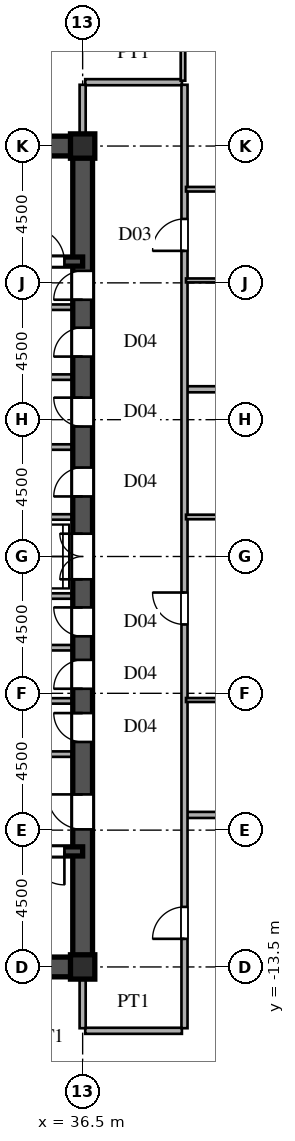
"""IFC4 building model, lengths in metres.
Left out: names, types, materials, properties, quantities, classifications, styles, units other than length and angle.
Written with IfcOpenShell. Run it as: python <this file> out.ifc"""

import sys

from ifc_helpers import new_model, si_unit, direction, frame, frame_2d, origin, origin_2d, place, context, subcontext, project, spatial, rectangle, i_section, extrude, source, transform, mapped, element, fill, save


model = new_model("IFC4")
c1 = context("Model", 3, precision=1e-05, world=origin(), true_north=direction((0.0, 1.0)))
c2 = subcontext(c1, "Body", "Model", "MODEL_VIEW")
j1 = project(units=[si_unit("LENGTHUNIT", "METRE"), si_unit("PLANEANGLEUNIT", "RADIAN")], contexts=[c1])
p1 = place(None, origin())
s1 = spatial("IfcSite", under=j1, at=p1, CompositionType="ELEMENT")
p2 = place(p1, origin())
s2 = spatial("IfcBuilding", under=s1, at=p2, CompositionType="ELEMENT")
p3 = place(p2, frame((0.0, 0.0, 76.5)))
s3 = spatial("IfcBuildingStorey", under=s2, at=p3, CompositionType="ELEMENT", Elevation=76.5)
m1 = source(origin(), c2, "Body", "SweptSolid", [
    extrude(i_section(OverallWidth=0.8, OverallDepth=0.8, WebThickness=0.032, FlangeThickness=0.05, at=origin_2d()), origin(), (0.0, 0.0, 1.0), 3.6),
])
for number, where, z_axis, x_axis in (
    (1, (36.5, -13.5, 0.0), (0.0, 0.0, 1.0), (1.0, 0.0, 0.0)),
    (2, (36.5, 13.5, 0.0), (0.0, 0.0, 1.0), (1.0, 0.0, 0.0)),
):
    element("IfcColumn", number, at=place(p3, frame(where, z_axis=z_axis, x_axis=x_axis)), inside=s3, PredefinedType="COLUMN", context=c2, shape_type="MappedRepresentation", body=[
        mapped(m1, transform((0.0, 0.0, 0.0), scale=1.0)),
    ])
for number, where, z_axis, x_axis in (
    (3, (27.5, -13.5, 0.0), (0.0, 0.0, 1.0), (1.0, 0.0, 0.0)),
    (4, (27.5, 13.5, 0.0), (0.0, 0.0, 1.0), (1.0, 0.0, 0.0)),
):
    element("IfcWall", number, at=place(p3, frame(where, z_axis=z_axis, x_axis=x_axis)), inside=s3, PredefinedType="SHEAR", context=c2, shape_type="SweptSolid", body=[
        extrude(rectangle(XDim=9.0, YDim=0.65, at=frame_2d((4.5, 0.0))), origin(), (0.0, 0.0, 1.0), 3.38),
    ])
p4 = place(p3, frame((36.5, -13.65, 0.0), z_axis=(0.0, 0.0, 1.0), x_axis=(0.0, 1.0, 0.0)))
e5 = element("IfcWall", 5, at=p4, inside=s3, PredefinedType="SHEAR", context=c2, shape_type="SweptSolid", body=[
    extrude(rectangle(XDim=7.15, YDim=0.65, at=frame_2d((3.575, 0.0))), origin(), (0.0, 0.0, 1.0), 3.38),
])
p5 = place(p4, frame((4.675, 0.0, 0.0)))
e6 = element("IfcOpeningElement", 6, at=p5, cuts=e5, PredefinedType="OPENING", context=c2, shape_type="SweptSolid", body=[
    extrude(rectangle(XDim=1.15, YDim=2.2, at=frame_2d((0.575, 1.1))), frame((0.0, 0.335, 0.0), z_axis=(0.0, -1.0, 0.0), x_axis=(1.0, 0.0, 0.0)), (0.0, 0.0, 1.0), 0.67),
])
p6 = place(p3, frame((36.5, -1.3, 0.0), z_axis=(0.0, 0.0, 1.0), x_axis=(0.0, 1.0, 0.0)))
e7 = element("IfcWall", 7, at=p6, inside=s3, PredefinedType="SHEAR", context=c2, shape_type="SweptSolid", body=[
    extrude(rectangle(XDim=2.6, YDim=0.65, at=frame_2d((1.3, 0.0))), origin(), (0.0, 0.0, 1.0), 3.38),
])
p7 = place(p6, frame((0.55, 0.0, 0.0)))
e8 = element("IfcOpeningElement", 8, at=p7, cuts=e7, PredefinedType="OPENING", context=c2, shape_type="SweptSolid", body=[
    extrude(rectangle(XDim=1.5, YDim=2.3, at=frame_2d((0.75, 1.15))), frame((0.0, 0.335, 0.0), z_axis=(0.0, -1.0, 0.0), x_axis=(1.0, 0.0, 0.0)), (0.0, 0.0, 1.0), 0.67),
])
p8 = place(p3, frame((36.5, 8.2, 0.0), z_axis=(0.0, 0.0, 1.0), x_axis=(0.0, 1.0, 0.0)))
e9 = element("IfcWall", 9, at=p8, inside=s3, PredefinedType="SHEAR", context=c2, shape_type="SweptSolid", body=[
    extrude(rectangle(XDim=5.45, YDim=0.65, at=frame_2d((2.725, 0.0))), origin(), (0.0, 0.0, 1.0), 3.38),
])
p9 = place(p8, frame((0.245, 0.0, 0.0)))
e10 = element("IfcOpeningElement", 10, at=p9, cuts=e9, PredefinedType="OPENING", context=c2, shape_type="SweptSolid", body=[
    extrude(rectangle(XDim=0.95, YDim=2.15, at=frame_2d((0.475, 1.075))), frame((0.0, 0.335, 0.0), z_axis=(0.0, -1.0, 0.0), x_axis=(1.0, 0.0, 0.0)), (0.0, 0.0, 1.0), 0.67),
])
p10 = place(p3, frame((36.5, -6.5, 0.0), z_axis=(0.0, 0.0, 1.0), x_axis=(0.0, 1.0, 0.0)))
e11 = element("IfcWall", 11, at=p10, inside=s3, PredefinedType="SHEAR", context=c2, shape_type="SweptSolid", body=[
    extrude(rectangle(XDim=1.75, YDim=0.65, at=frame_2d((0.875, 0.0))), origin(), (0.0, 0.0, 1.0), 3.38),
])
p11 = place(p10, frame((0.4, 0.0, 0.0)))
e12 = element("IfcOpeningElement", 12, at=p11, cuts=e11, PredefinedType="OPENING", context=c2, shape_type="SweptSolid", body=[
    extrude(rectangle(XDim=0.95, YDim=2.15, at=frame_2d((0.475, 1.075))), frame((0.0, 0.335, 0.0), z_axis=(0.0, -1.0, 0.0), x_axis=(1.0, 0.0, 0.0)), (0.0, 0.0, 1.0), 0.67),
])
p12 = place(p3, frame((36.5, -4.75, 0.0), z_axis=(0.0, 0.0, 1.0), x_axis=(0.0, 1.0, 0.0)))
e13 = element("IfcWall", 13, at=p12, inside=s3, PredefinedType="SHEAR", context=c2, shape_type="SweptSolid", body=[
    extrude(rectangle(XDim=1.75, YDim=0.65, at=frame_2d((0.875, 0.0))), origin(), (0.0, 0.0, 1.0), 3.38),
])
p13 = place(p12, frame((0.4, 0.0, 0.0)))
e14 = element("IfcOpeningElement", 14, at=p13, cuts=e13, PredefinedType="OPENING", context=c2, shape_type="SweptSolid", body=[
    extrude(rectangle(XDim=0.95, YDim=2.15, at=frame_2d((0.475, 1.075))), frame((0.0, 0.335, 0.0), z_axis=(0.0, -1.0, 0.0), x_axis=(1.0, 0.0, 0.0)), (0.0, 0.0, 1.0), 0.67),
])
p14 = place(p3, frame((36.5, -3.0, 0.0), z_axis=(0.0, 0.0, 1.0), x_axis=(0.0, 1.0, 0.0)))
e15 = element("IfcWall", 15, at=p14, inside=s3, PredefinedType="SHEAR", context=c2, shape_type="SweptSolid", body=[
    extrude(rectangle(XDim=1.7, YDim=0.65, at=frame_2d((0.85, 0.0))), origin(), (0.0, 0.0, 1.0), 3.38),
])
p15 = place(p14, frame((0.375, 0.0, 0.0)))
e16 = element("IfcOpeningElement", 16, at=p15, cuts=e15, PredefinedType="OPENING", context=c2, shape_type="SweptSolid", body=[
    extrude(rectangle(XDim=0.95, YDim=2.15, at=frame_2d((0.475, 1.075))), frame((0.0, 0.335, 0.0), z_axis=(0.0, -1.0, 0.0), x_axis=(1.0, 0.0, 0.0)), (0.0, 0.0, 1.0), 0.67),
])
p16 = place(p3, frame((36.5, 1.3, 0.0), z_axis=(0.0, 0.0, 1.0), x_axis=(0.0, 1.0, 0.0)))
e17 = element("IfcWall", 17, at=p16, inside=s3, PredefinedType="SHEAR", context=c2, shape_type="SweptSolid", body=[
    extrude(rectangle(XDim=2.3, YDim=0.65, at=frame_2d((1.15, 0.0))), origin(), (0.0, 0.0, 1.0), 3.38),
])
p17 = place(p16, frame((0.675, 0.0, 0.0)))
e18 = element("IfcOpeningElement", 18, at=p17, cuts=e17, PredefinedType="OPENING", context=c2, shape_type="SweptSolid", body=[
    extrude(rectangle(XDim=0.95, YDim=2.15, at=frame_2d((0.475, 1.075))), frame((0.0, 0.335, 0.0), z_axis=(0.0, -1.0, 0.0), x_axis=(1.0, 0.0, 0.0)), (0.0, 0.0, 1.0), 0.67),
])
p18 = place(p3, frame((36.5, 3.6, 0.0), z_axis=(0.0, 0.0, 1.0), x_axis=(0.0, 1.0, 0.0)))
e19 = element("IfcWall", 19, at=p18, inside=s3, PredefinedType="SHEAR", context=c2, shape_type="SweptSolid", body=[
    extrude(rectangle(XDim=2.3, YDim=0.65, at=frame_2d((1.15, 0.0))), origin(), (0.0, 0.0, 1.0), 3.38),
])
p19 = place(p18, frame((0.675, 0.0, 0.0)))
e20 = element("IfcOpeningElement", 20, at=p19, cuts=e19, PredefinedType="OPENING", context=c2, shape_type="SweptSolid", body=[
    extrude(rectangle(XDim=0.95, YDim=2.15, at=frame_2d((0.475, 1.075))), frame((0.0, 0.335, 0.0), z_axis=(0.0, -1.0, 0.0), x_axis=(1.0, 0.0, 0.0)), (0.0, 0.0, 1.0), 0.67),
])
p20 = place(p3, frame((36.5, 5.9, 0.0), z_axis=(0.0, 0.0, 1.0), x_axis=(0.0, 1.0, 0.0)))
e21 = element("IfcWall", 21, at=p20, inside=s3, PredefinedType="SHEAR", context=c2, shape_type="SweptSolid", body=[
    extrude(rectangle(XDim=2.3, YDim=0.65, at=frame_2d((1.15, 0.0))), origin(), (0.0, 0.0, 1.0), 3.38),
])
p21 = place(p20, frame((0.675, 0.0, 0.0)))
e22 = element("IfcOpeningElement", 22, at=p21, cuts=e21, PredefinedType="OPENING", context=c2, shape_type="SweptSolid", body=[
    extrude(rectangle(XDim=0.95, YDim=2.15, at=frame_2d((0.475, 1.075))), frame((0.0, 0.335, 0.0), z_axis=(0.0, -1.0, 0.0), x_axis=(1.0, 0.0, 0.0)), (0.0, 0.0, 1.0), 0.67),
])
p22 = place(p3, frame((27.5, -9.7, 0.0), z_axis=(0.0, 0.0, 1.0), x_axis=(1.0, 0.0, 0.0)))
e23 = element("IfcWall", 23, at=p22, inside=s3, PredefinedType="SHEAR", context=c2, shape_type="SweptSolid", body=[
    extrude(rectangle(XDim=9.0, YDim=0.3, at=frame_2d((4.5, 0.0))), origin(), (0.0, 0.0, 1.0), 3.38),
])
p23 = place(p22, frame((7.3, 0.0, 0.0)))
e24 = element("IfcOpeningElement", 24, at=p23, cuts=e23, PredefinedType="OPENING", context=c2, shape_type="SweptSolid", body=[
    extrude(rectangle(XDim=1.1, YDim=2.2, at=frame_2d((0.55, 1.1))), frame((0.0, 0.16, 0.0), z_axis=(0.0, -1.0, 0.0), x_axis=(1.0, 0.0, 0.0)), (0.0, 0.0, 1.0), 0.32),
])
p24 = place(p3, frame((27.5, 9.7, 0.0), z_axis=(0.0, 0.0, 1.0), x_axis=(1.0, 0.0, 0.0)))
e25 = element("IfcWall", 25, at=p24, inside=s3, PredefinedType="SHEAR", context=c2, shape_type="SweptSolid", body=[
    extrude(rectangle(XDim=9.0, YDim=0.3, at=frame_2d((4.5, 0.0))), origin(), (0.0, 0.0, 1.0), 3.38),
])
p25 = place(p24, frame((7.3, 0.0, 0.0)))
e26 = element("IfcOpeningElement", 26, at=p25, cuts=e25, PredefinedType="OPENING", context=c2, shape_type="SweptSolid", body=[
    extrude(rectangle(XDim=1.1, YDim=2.2, at=frame_2d((0.55, 1.1))), frame((0.0, 0.16, 0.0), z_axis=(0.0, -1.0, 0.0), x_axis=(1.0, 0.0, 0.0)), (0.0, 0.0, 1.0), 0.32),
])
for number, where, z_axis, x_axis in (
    (27, (30.45, -6.5, 0.0), (0.0, 0.0, 1.0), (1.0, 0.0, 0.0)),
    (28, (30.45, 8.2, 0.0), (0.0, 0.0, 1.0), (1.0, 0.0, 0.0)),
):
    element("IfcWall", number, at=place(p3, frame(where, z_axis=z_axis, x_axis=x_axis)), inside=s3, PredefinedType="PARTITIONING", context=c2, shape_type="SweptSolid", body=[
        extrude(rectangle(XDim=5.7, YDim=0.18, at=frame_2d((2.85, 0.0))), origin(), (0.0, 0.0, 1.0), 3.38),
    ])
for number, where, z_axis, x_axis in (
    (29, (33.2, -1.3, 0.0), (0.0, 0.0, 1.0), (1.0, 0.0, 0.0)),
    (30, (33.2, 1.3, 0.0), (0.0, 0.0, 1.0), (1.0, 0.0, 0.0)),
    (31, (33.2, -4.75, 0.0), (0.0, 0.0, 1.0), (1.0, 0.0, 0.0)),
    (32, (33.2, -3.0, 0.0), (0.0, 0.0, 1.0), (1.0, 0.0, 0.0)),
    (33, (33.2, 3.6, 0.0), (0.0, 0.0, 1.0), (1.0, 0.0, 0.0)),
    (34, (33.2, 5.9, 0.0), (0.0, 0.0, 1.0), (1.0, 0.0, 0.0)),
):
    element("IfcWall", number, at=place(p3, frame(where, z_axis=z_axis, x_axis=x_axis)), inside=s3, PredefinedType="PARTITIONING", context=c2, shape_type="SweptSolid", body=[
        extrude(rectangle(XDim=2.95, YDim=0.18, at=frame_2d((1.475, 0.0))), origin(), (0.0, 0.0, 1.0), 3.38),
    ])
p26 = place(p3, frame((36.585, -15.6, 0.0), z_axis=(0.0, 0.0, 1.0), x_axis=(1.0, 0.0, 0.0)))
e35 = element("IfcWall", 35, at=p26, inside=s3, PredefinedType="PARTITIONING", context=c2, shape_type="SweptSolid", body=[
    extrude(rectangle(XDim=3.18, YDim=0.2, at=frame_2d((1.59, 0.0))), origin(), (0.0, 0.0, 1.0), 3.38),
])
p27 = place(p3, frame((39.93, -8.5, 0.0), z_axis=(0.0, 0.0, 1.0), x_axis=(1.0, 0.0, 0.0)))
e36 = element("IfcWall", 36, at=p27, inside=s3, PredefinedType="PARTITIONING", context=c2, shape_type="SweptSolid", body=[
    extrude(rectangle(XDim=28.86, YDim=0.2, at=frame_2d((14.43, 0.0))), origin(), (0.0, 0.0, 1.0), 3.38),
])
p28 = place(p3, frame((39.9, -4.72, 0.0), z_axis=(0.0, 0.0, 1.0), x_axis=(1.0, 0.0, 0.0)))
e37 = element("IfcWall", 37, at=p28, inside=s3, PredefinedType="PARTITIONING", context=c2, shape_type="SweptSolid", body=[
    extrude(rectangle(XDim=5.55, YDim=0.13, at=frame_2d((2.775, 0.0))), origin(), (0.0, 0.0, 1.0), 3.38),
])
p29 = place(p28, frame((2.335, 0.0, 0.0)))
e38 = element("IfcOpeningElement", 38, at=p29, cuts=e37, PredefinedType="OPENING", context=c2, shape_type="SweptSolid", body=[
    extrude(rectangle(XDim=0.88, YDim=2.1, at=frame_2d((0.44, 1.05))), frame((0.0, 0.075, 0.0), z_axis=(0.0, -1.0, 0.0), x_axis=(1.0, 0.0, 0.0)), (0.0, 0.0, 1.0), 0.15),
])
p30 = place(p3, frame((39.9, 1.3, 0.0), z_axis=(0.0, 0.0, 1.0), x_axis=(1.0, 0.0, 0.0)))
e39 = element("IfcWall", 39, at=p30, inside=s3, PredefinedType="PARTITIONING", context=c2, shape_type="SweptSolid", body=[
    extrude(rectangle(XDim=5.55, YDim=0.15, at=frame_2d((2.775, 0.0))), origin(), (0.0, 0.0, 1.0), 3.38),
])
p31 = place(p30, frame((2.3, 0.0, 0.0)))
e40 = element("IfcOpeningElement", 40, at=p31, cuts=e39, PredefinedType="OPENING", context=c2, shape_type="SweptSolid", body=[
    extrude(rectangle(XDim=0.95, YDim=2.15, at=frame_2d((0.475, 1.075))), frame((0.0, 0.085, 0.0), z_axis=(0.0, -1.0, 0.0), x_axis=(1.0, 0.0, 0.0)), (0.0, 0.0, 1.0), 0.17),
])
p32 = place(p3, frame((39.93, 5.5, 0.0), z_axis=(0.0, 0.0, 1.0), x_axis=(1.0, 0.0, 0.0)))
e41 = element("IfcWall", 41, at=p32, inside=s3, PredefinedType="PARTITIONING", context=c2, shape_type="SweptSolid", body=[
    extrude(rectangle(XDim=31.075, YDim=0.2, at=frame_2d((15.538, 0.0))), origin(), (0.0, 0.0, 1.0), 3.38),
])
p33 = place(p3, frame((39.9, 9.08, 0.0), z_axis=(0.0, 0.0, 1.0), x_axis=(1.0, 0.0, 0.0)))
e42 = element("IfcWall", 42, at=p33, inside=s3, PredefinedType="PARTITIONING", context=c2, shape_type="SweptSolid", body=[
    extrude(rectangle(XDim=5.55, YDim=0.13, at=frame_2d((2.775, 0.0))), origin(), (0.0, 0.0, 1.0), 3.38),
])
p34 = place(p33, frame((2.335, 0.0, 0.0)))
e43 = element("IfcOpeningElement", 43, at=p34, cuts=e42, PredefinedType="OPENING", context=c2, shape_type="SweptSolid", body=[
    extrude(rectangle(XDim=0.88, YDim=2.1, at=frame_2d((0.44, 1.05))), frame((0.0, 0.075, 0.0), z_axis=(0.0, -1.0, 0.0), x_axis=(1.0, 0.0, 0.0)), (0.0, 0.0, 1.0), 0.15),
])
p35 = place(p3, frame((39.9, 12.08, 0.0), z_axis=(0.0, 0.0, 1.0), x_axis=(1.0, 0.0, 0.0)))
e44 = element("IfcWall", 44, at=p35, inside=s3, PredefinedType="PARTITIONING", context=c2, shape_type="SweptSolid", body=[
    extrude(rectangle(XDim=5.55, YDim=0.15, at=frame_2d((2.775, 0.0))), origin(), (0.0, 0.0, 1.0), 3.38),
])
p36 = place(p35, frame((2.3, 0.0, 0.0)))
e45 = element("IfcOpeningElement", 45, at=p36, cuts=e44, PredefinedType="OPENING", context=c2, shape_type="SweptSolid", body=[
    extrude(rectangle(XDim=0.95, YDim=2.15, at=frame_2d((0.475, 1.075))), frame((0.0, 0.085, 0.0), z_axis=(0.0, -1.0, 0.0), x_axis=(1.0, 0.0, 0.0)), (0.0, 0.0, 1.0), 0.17),
])
p37 = place(p3, frame((36.585, 15.6, 0.0), z_axis=(0.0, 0.0, 1.0), x_axis=(1.0, 0.0, 0.0)))
e46 = element("IfcWall", 46, at=p37, inside=s3, PredefinedType="PARTITIONING", context=c2, shape_type="SweptSolid", body=[
    extrude(rectangle(XDim=3.18, YDim=0.2, at=frame_2d((1.59, 0.0))), origin(), (0.0, 0.0, 1.0), 3.38),
])
for number, where, z_axis, x_axis in (
    (47, (36.5, -15.515, 0.0), (0.0, 0.0, 1.0), (0.0, 1.0, 0.0)),
    (48, (36.5, 13.83, 0.0), (0.0, 0.0, 1.0), (0.0, 1.0, 0.0)),
):
    element("IfcWall", number, at=place(p3, frame(where, z_axis=z_axis, x_axis=x_axis)), inside=s3, PredefinedType="PARTITIONING", context=c2, shape_type="SweptSolid", body=[
        extrude(rectangle(XDim=1.685, YDim=0.2, at=frame_2d((0.842, 0.0))), origin(), (0.0, 0.0, 1.0), 2.68),
    ])
p38 = place(p3, frame((39.8, 15.65, 0.0), z_axis=(0.0, 0.0, 1.0), x_axis=(0.0, 1.0, 0.0)))
e49 = element("IfcWall", 49, at=p38, inside=s3, PredefinedType="PARTITIONING", context=c2, shape_type="SweptSolid", body=[
    extrude(rectangle(XDim=5.925, YDim=0.15, at=frame_2d((2.962, 0.0))), origin(), (0.0, 0.0, 1.0), 3.38),
])
p39 = place(p38, frame((2.029, 0.0, 0.0)))
e50 = element("IfcOpeningElement", 50, at=p39, cuts=e49, PredefinedType="OPENING", context=c2, shape_type="SweptSolid", body=[
    extrude(rectangle(XDim=0.95, YDim=2.15, at=frame_2d((0.475, 1.075))), frame((0.0, 0.085, 0.0), z_axis=(0.0, -1.0, 0.0), x_axis=(1.0, 0.0, 0.0)), (0.0, 0.0, 1.0), 0.17),
])
p40 = place(p3, frame((39.85, -15.515, 0.0), z_axis=(0.0, 0.0, 1.0), x_axis=(0.0, 1.0, 0.0)))
e51 = element("IfcWall", 51, at=p40, inside=s3, PredefinedType="PARTITIONING", context=c2, shape_type="SweptSolid", body=[
    extrude(rectangle(XDim=31.03, YDim=0.2, at=frame_2d((15.515, 0.0))), origin(), (0.0, 0.0, 1.0), 3.38),
])
p41 = place(p40, frame((2.94, 0.0, 0.0)))
e52 = element("IfcOpeningElement", 52, at=p41, cuts=e51, PredefinedType="OPENING", context=c2, shape_type="SweptSolid", body=[
    extrude(rectangle(XDim=1.05, YDim=2.25, at=frame_2d((0.525, 1.125))), frame((0.0, 0.11, 0.0), z_axis=(0.0, -1.0, 0.0), x_axis=(1.0, 0.0, 0.0)), (0.0, 0.0, 1.0), 0.22),
])
p42 = place(p40, frame((13.28, 0.0, 0.0)))
e53 = element("IfcOpeningElement", 53, at=p42, cuts=e51, PredefinedType="OPENING", context=c2, shape_type="SweptSolid", body=[
    extrude(rectangle(XDim=1.05, YDim=2.25, at=frame_2d((0.525, 1.125))), frame((0.0, 0.11, 0.0), z_axis=(0.0, -1.0, 0.0), x_axis=(1.0, 0.0, 0.0)), (0.0, 0.0, 1.0), 0.22),
])
p43 = place(p40, frame((25.567, 0.0, 0.0)))
e54 = element("IfcOpeningElement", 54, at=p43, cuts=e51, PredefinedType="OPENING", context=c2, shape_type="SweptSolid", body=[
    extrude(rectangle(XDim=1.05, YDim=2.25, at=frame_2d((0.525, 1.125))), frame((0.0, 0.11, 0.0), z_axis=(0.0, -1.0, 0.0), x_axis=(1.0, 0.0, 0.0)), (0.0, 0.0, 1.0), 0.22),
])
m2 = source(origin(), c2, "Body", "SweptSolid", [
    extrude(rectangle(XDim=1.15, YDim=2.2, at=frame_2d((0.575, 1.1))), frame((0.0, 0.025, 0.0), z_axis=(0.0, -1.0, 0.0), x_axis=(1.0, 0.0, 0.0)), (0.0, 0.0, 1.0), 0.05),
])
p44 = place(p5, origin())
e55 = element("IfcDoor", 55, at=p44, inside=s3, OperationType="SINGLE_SWING_RIGHT", PredefinedType="DOOR", context=c2, shape_type="MappedRepresentation", body=[
    mapped(m2, transform((0.0, 0.0, 0.0), scale=1.0)),
])
fill(e6, e55)
m3 = source(origin(), c2, "Body", "SweptSolid", [
    extrude(rectangle(XDim=1.5, YDim=2.3, at=frame_2d((0.75, 1.15))), frame((0.0, 0.025, 0.0), z_axis=(0.0, -1.0, 0.0), x_axis=(1.0, 0.0, 0.0)), (0.0, 0.0, 1.0), 0.05),
])
p45 = place(p7, origin())
e56 = element("IfcDoor", 56, at=p45, inside=s3, OperationType="DOUBLE_SWING_LEFT", PredefinedType="DOOR", context=c2, shape_type="MappedRepresentation", body=[
    mapped(m3, transform((0.0, 0.0, 0.0), scale=1.0)),
])
fill(e8, e56)
m4 = source(origin(), c2, "Body", "SweptSolid", [
    extrude(rectangle(XDim=0.95, YDim=2.15, at=frame_2d((0.475, 1.075))), frame((0.0, 0.025, 0.0), z_axis=(0.0, -1.0, 0.0), x_axis=(1.0, 0.0, 0.0)), (0.0, 0.0, 1.0), 0.05),
])
p46 = place(p9, origin())
e57 = element("IfcDoor", 57, at=p46, inside=s3, OperationType="SINGLE_SWING_LEFT", PredefinedType="DOOR", context=c2, shape_type="MappedRepresentation", body=[
    mapped(m4, transform((0.0, 0.0, 0.0), scale=1.0)),
])
fill(e10, e57)
p47 = place(p11, origin())
e58 = element("IfcDoor", 58, at=p47, inside=s3, OperationType="SINGLE_SWING_RIGHT", PredefinedType="DOOR", context=c2, shape_type="MappedRepresentation", body=[
    mapped(m4, transform((0.0, 0.0, 0.0), scale=1.0)),
])
fill(e12, e58)
p48 = place(p13, origin())
e59 = element("IfcDoor", 59, at=p48, inside=s3, OperationType="SINGLE_SWING_LEFT", PredefinedType="DOOR", context=c2, shape_type="MappedRepresentation", body=[
    mapped(m4, transform((0.0, 0.0, 0.0), scale=1.0)),
])
fill(e14, e59)
p49 = place(p15, origin())
e60 = element("IfcDoor", 60, at=p49, inside=s3, OperationType="SINGLE_SWING_RIGHT", PredefinedType="DOOR", context=c2, shape_type="MappedRepresentation", body=[
    mapped(m4, transform((0.0, 0.0, 0.0), scale=1.0)),
])
fill(e16, e60)
p50 = place(p17, origin())
e61 = element("IfcDoor", 61, at=p50, inside=s3, OperationType="SINGLE_SWING_LEFT", PredefinedType="DOOR", context=c2, shape_type="MappedRepresentation", body=[
    mapped(m4, transform((0.0, 0.0, 0.0), scale=1.0)),
])
fill(e18, e61)
p51 = place(p19, origin())
e62 = element("IfcDoor", 62, at=p51, inside=s3, OperationType="SINGLE_SWING_RIGHT", PredefinedType="DOOR", context=c2, shape_type="MappedRepresentation", body=[
    mapped(m4, transform((0.0, 0.0, 0.0), scale=1.0)),
])
fill(e20, e62)
p52 = place(p21, origin())
e63 = element("IfcDoor", 63, at=p52, inside=s3, OperationType="SINGLE_SWING_LEFT", PredefinedType="DOOR", context=c2, shape_type="MappedRepresentation", body=[
    mapped(m4, transform((0.0, 0.0, 0.0), scale=1.0)),
])
fill(e22, e63)
m5 = source(origin(), c2, "Body", "SweptSolid", [
    extrude(rectangle(XDim=1.1, YDim=2.2, at=frame_2d((0.55, 1.1))), frame((0.0, 0.025, 0.0), z_axis=(0.0, -1.0, 0.0), x_axis=(1.0, 0.0, 0.0)), (0.0, 0.0, 1.0), 0.05),
])
p53 = place(p23, frame((1.1, 0.0, 0.0), z_axis=(0.0, 0.0, 1.0), x_axis=(-1.0, 0.0, 0.0)))
e64 = element("IfcDoor", 64, at=p53, inside=s3, OperationType="SINGLE_SWING_RIGHT", PredefinedType="DOOR", context=c2, shape_type="MappedRepresentation", body=[
    mapped(m5, transform((0.0, 0.0, 0.0), scale=1.0)),
])
fill(e24, e64)
p54 = place(p25, origin())
e65 = element("IfcDoor", 65, at=p54, inside=s3, OperationType="SINGLE_SWING_LEFT", PredefinedType="DOOR", context=c2, shape_type="MappedRepresentation", body=[
    mapped(m5, transform((0.0, 0.0, 0.0), scale=1.0)),
])
fill(e26, e65)
m6 = source(origin(), c2, "Body", "SweptSolid", [
    extrude(rectangle(XDim=1.05, YDim=2.25, at=frame_2d((0.525, 1.125))), frame((0.0, 0.025, 0.0), z_axis=(0.0, -1.0, 0.0), x_axis=(1.0, 0.0, 0.0)), (0.0, 0.0, 1.0), 0.05),
])
p55 = place(p41, origin())
e66 = element("IfcDoor", 66, at=p55, inside=s3, OperationType="SINGLE_SWING_LEFT", PredefinedType="DOOR", context=c2, shape_type="MappedRepresentation", body=[
    mapped(m6, transform((0.0, 0.0, 0.0), scale=1.0)),
])
fill(e52, e66)
p56 = place(p42, origin())
e67 = element("IfcDoor", 67, at=p56, inside=s3, OperationType="SINGLE_SWING_RIGHT", PredefinedType="DOOR", context=c2, shape_type="MappedRepresentation", body=[
    mapped(m6, transform((0.0, 0.0, 0.0), scale=1.0)),
])
fill(e53, e67)
p57 = place(p43, origin())
e68 = element("IfcDoor", 68, at=p57, inside=s3, OperationType="SINGLE_SWING_LEFT", PredefinedType="DOOR", context=c2, shape_type="MappedRepresentation", body=[
    mapped(m6, transform((0.0, 0.0, 0.0), scale=1.0)),
])
fill(e54, e68)
save(model, sys.argv[1])
